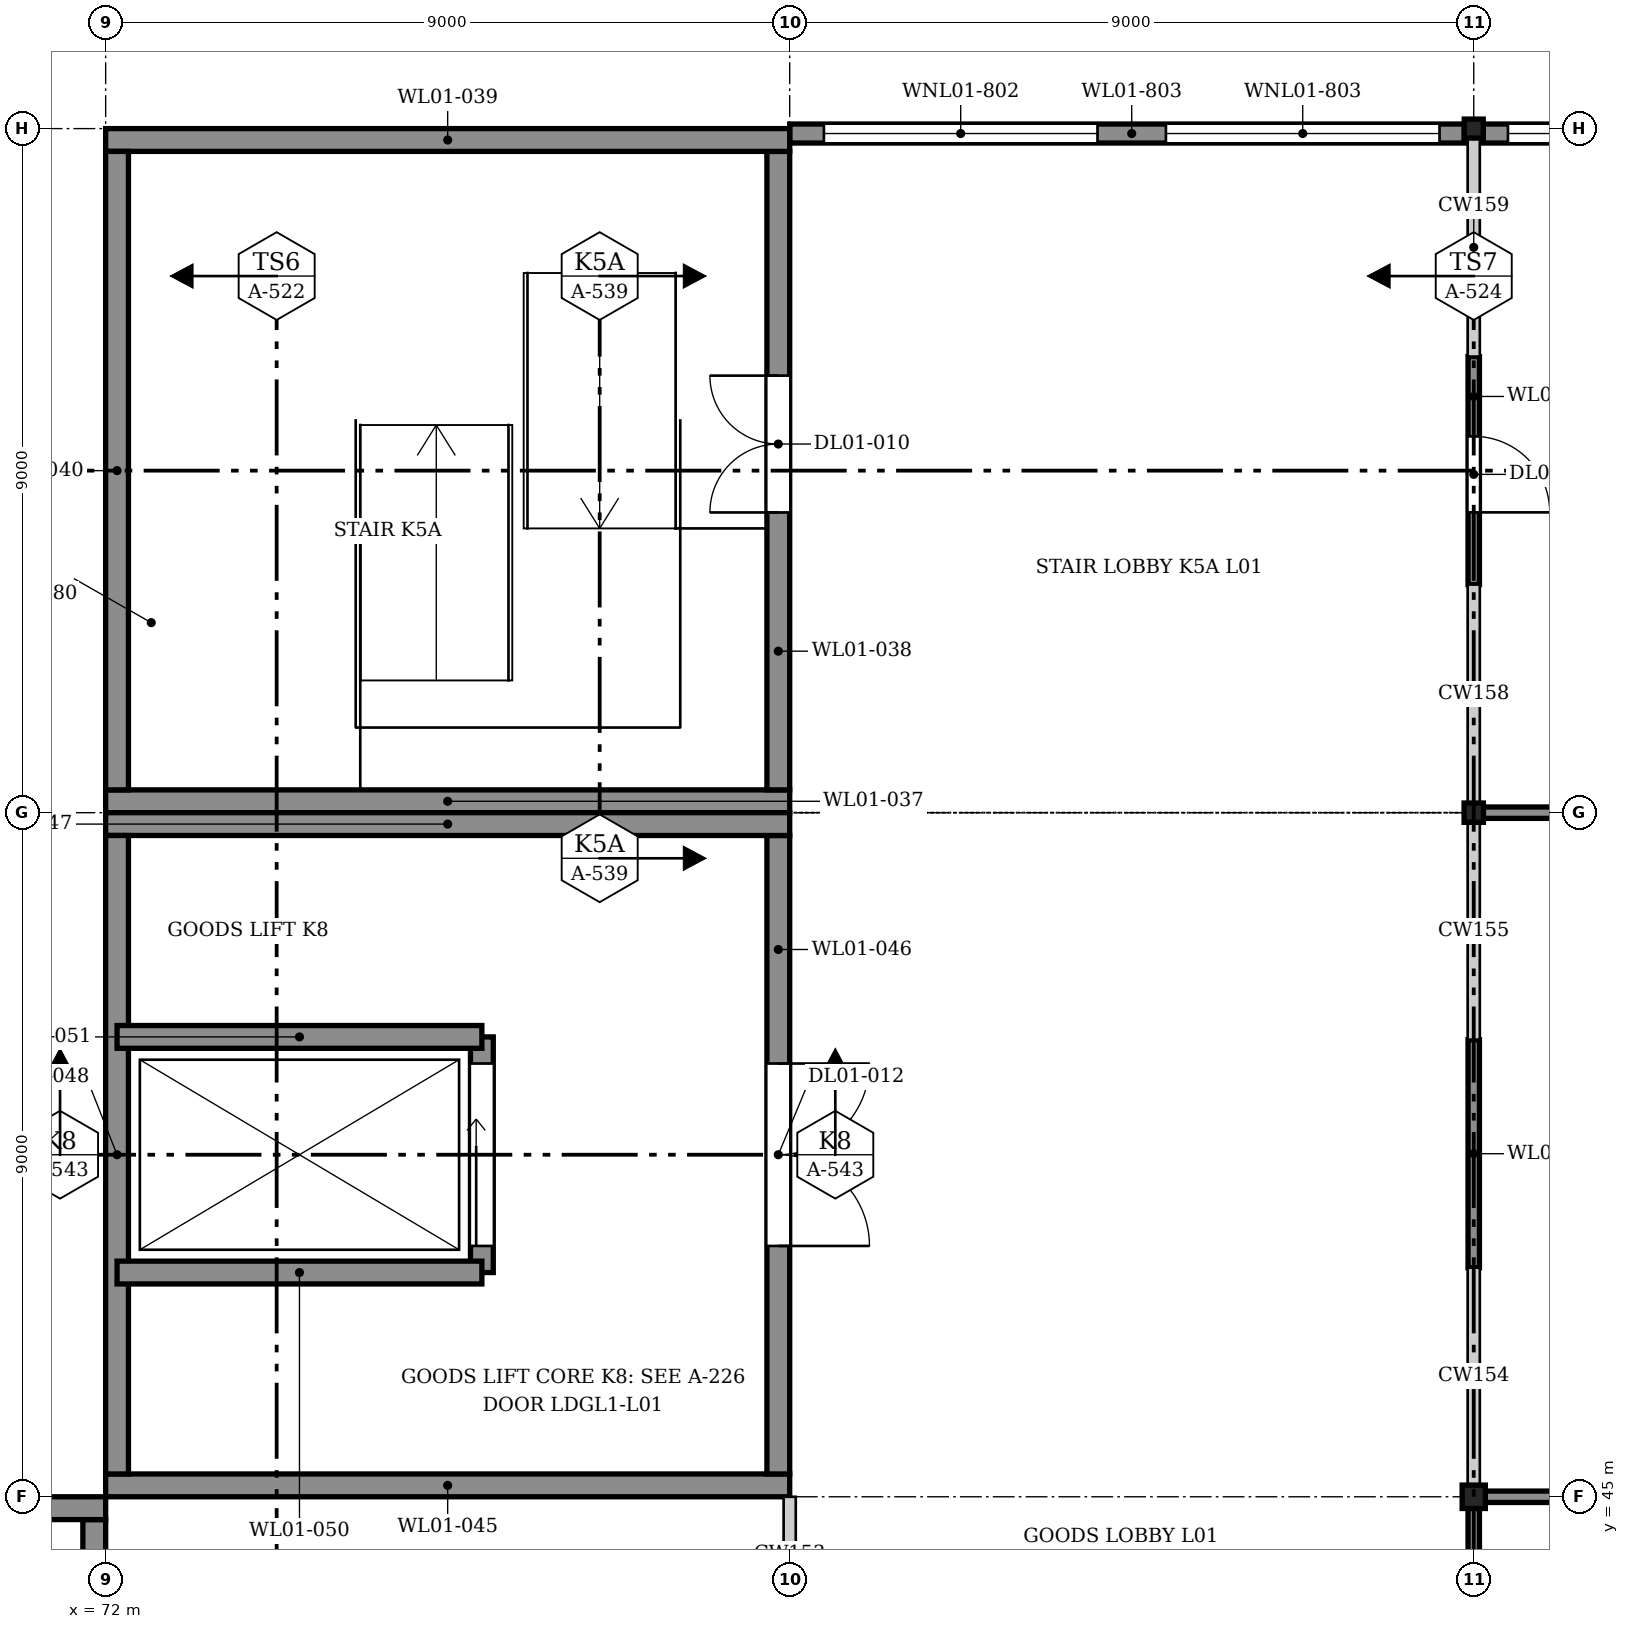
"""IFC4 building model, lengths in metres.
Left out: names, types, materials, properties, quantities, classifications, styles, units other than length and angle.
Written with IfcOpenShell. Run it as: python <this file> out.ifc"""

import sys

from ifc_helpers import new_model, si_unit, direction, frame, frame_2d, origin, origin_2d, place, context, subcontext, project, spatial, rectangle, hollow_rectangle, i_section, extrude, element, fill, save


model = new_model("IFC4")
c1 = context("Model", 3, precision=1e-05, world=origin(), true_north=direction((0.0, 1.0)))
c2 = subcontext(c1, "Body", "Model", "MODEL_VIEW")
j1 = project(units=[si_unit("LENGTHUNIT", "METRE"), si_unit("PLANEANGLEUNIT", "RADIAN")], contexts=[c1])
p1 = place(None, origin())
s1 = spatial("IfcSite", under=j1, at=p1, CompositionType="ELEMENT")
p2 = place(p1, origin())
s2 = spatial("IfcBuilding", under=s1, at=p2, CompositionType="ELEMENT")
p3 = place(p2, frame((0.0, 0.0, 5.0)))
s3 = spatial("IfcBuildingStorey", under=s2, at=p3, CompositionType="ELEMENT", Elevation=5.0)
p4 = place(p3, frame((90.0, 45.0, 0.0), z_axis=(0.0, 0.0, 1.0), x_axis=(1.0, 0.0, 0.0)))
e1 = element("IfcColumn", 1, at=p4, inside=s3, PredefinedType="COLUMN", context=c2, shape_type="SweptSolid", body=[
    extrude(i_section(OverallWidth=0.305, OverallDepth=0.308, WebThickness=0.01, FlangeThickness=0.015, FilletRadius=0.017, at=origin_2d()), origin(), (0.0, 0.0, 1.0), 4.2),
])
p5 = place(p3, frame((90.0, 54.0, 0.0), z_axis=(0.0, 0.0, 1.0), x_axis=(1.0, 0.0, 0.0)))
e2 = element("IfcColumn", 2, at=p5, inside=s3, PredefinedType="COLUMN", context=c2, shape_type="SweptSolid", body=[
    extrude(i_section(OverallWidth=0.254, OverallDepth=0.254, WebThickness=0.009, FlangeThickness=0.014, FilletRadius=0.014, at=origin_2d()), origin(), (0.0, 0.0, 1.0), 3.9),
])
p6 = place(p3, frame((90.0, 63.0, 0.0), z_axis=(0.0, 0.0, 1.0), x_axis=(1.0, 0.0, 0.0)))
e3 = element("IfcColumn", 3, at=p6, inside=s3, PredefinedType="COLUMN", context=c2, shape_type="SweptSolid", body=[
    extrude(hollow_rectangle(XDim=0.25, YDim=0.25, WallThickness=0.01, InnerFilletRadius=0.015, OuterFilletRadius=0.025, at=origin_2d()), origin(), (0.0, 0.0, 1.0), 3.9),
])
p7 = place(p3, frame((90.125, 62.935, 0.0), z_axis=(0.0, 0.0, 1.0), x_axis=(1.0, 0.0, 0.0)))
e4 = element("IfcWall", 4, at=p7, inside=s3, PredefinedType="SOLIDWALL", context=c2, shape_type="SweptSolid", body=[
    extrude(rectangle(XDim=8.875, YDim=0.25, at=frame_2d((4.438, 0.0))), origin(), (0.0, 0.0, 1.0), 2.95),
])
p8 = place(p7, frame((0.325, 0.0, 1.1)))
e5 = element("IfcOpeningElement", 5, at=p8, cuts=e4, PredefinedType="OPENING", context=c2, shape_type="SweptSolid", body=[
    extrude(rectangle(XDim=3.6, YDim=1.2, at=frame_2d((1.8, 0.6))), frame((0.0, 0.135, 0.0), z_axis=(0.0, -1.0, 0.0), x_axis=(1.0, 0.0, 0.0)), (0.0, 0.0, 1.0), 0.27),
])
p9 = place(p7, frame((4.825, 0.0, 1.1)))
e6 = element("IfcOpeningElement", 6, at=p9, cuts=e4, PredefinedType="OPENING", context=c2, shape_type="SweptSolid", body=[
    extrude(rectangle(XDim=3.6, YDim=1.2, at=frame_2d((1.8, 0.6))), frame((0.0, 0.135, 0.0), z_axis=(0.0, -1.0, 0.0), x_axis=(1.0, 0.0, 0.0)), (0.0, 0.0, 1.0), 0.27),
])
p10 = place(p3, frame((81.0, 62.935, 0.0), z_axis=(0.0, 0.0, 1.0), x_axis=(1.0, 0.0, 0.0)))
e7 = element("IfcWall", 7, at=p10, inside=s3, PredefinedType="SOLIDWALL", context=c2, shape_type="SweptSolid", body=[
    extrude(rectangle(XDim=8.875, YDim=0.25, at=frame_2d((4.438, 0.0))), origin(), (0.0, 0.0, 1.0), 2.95),
])
p11 = place(p10, frame((0.45, 0.0, 1.1)))
e8 = element("IfcOpeningElement", 8, at=p11, cuts=e7, PredefinedType="OPENING", context=c2, shape_type="SweptSolid", body=[
    extrude(rectangle(XDim=3.6, YDim=1.2, at=frame_2d((1.8, 0.6))), frame((0.0, 0.135, 0.0), z_axis=(0.0, -1.0, 0.0), x_axis=(1.0, 0.0, 0.0)), (0.0, 0.0, 1.0), 0.27),
])
p12 = place(p10, frame((4.95, 0.0, 1.1)))
e9 = element("IfcOpeningElement", 9, at=p12, cuts=e7, PredefinedType="OPENING", context=c2, shape_type="SweptSolid", body=[
    extrude(rectangle(XDim=3.6, YDim=1.2, at=frame_2d((1.8, 0.6))), frame((0.0, 0.135, 0.0), z_axis=(0.0, -1.0, 0.0), x_axis=(1.0, 0.0, 0.0)), (0.0, 0.0, 1.0), 0.27),
])
p13 = place(p3, frame((71.85, 40.8, 0.0), z_axis=(0.0, 0.0, 1.0), x_axis=(0.0, 1.0, 0.0)))
e10 = element("IfcWall", 10, at=p13, inside=s3, PredefinedType="SOLIDWALL", context=c2, shape_type="SweptSolid", body=[
    extrude(rectangle(XDim=3.9, YDim=0.3, at=frame_2d((1.95, 0.0))), origin(), (0.0, 0.0, 1.0), 4.2),
])
for number, where, z_axis, x_axis in (
    (11, (63.0, 44.85, 0.0), (0.0, 0.0, 1.0), (1.0, 0.0, 0.0)),
    (12, (72.0, 54.15, 0.0), (0.0, 0.0, 1.0), (1.0, 0.0, 0.0)),
):
    element("IfcWall", number, at=place(p3, frame(where, z_axis=z_axis, x_axis=x_axis)), inside=s3, PredefinedType="SOLIDWALL", context=c2, shape_type="SweptSolid", body=[
        extrude(rectangle(XDim=9.0, YDim=0.3, at=frame_2d((4.5, 0.0))), origin(), (0.0, 0.0, 1.0), 4.2),
    ])
p14 = place(p3, frame((80.85, 54.3, 0.0), z_axis=(0.0, 0.0, 1.0), x_axis=(0.0, 1.0, 0.0)))
e13 = element("IfcWall", 13, at=p14, inside=s3, PredefinedType="SOLIDWALL", context=c2, shape_type="SweptSolid", body=[
    extrude(rectangle(XDim=8.4, YDim=0.3, at=frame_2d((4.2, 0.0))), origin(), (0.0, 0.0, 1.0), 4.2),
])
p15 = place(p14, frame((3.65, 0.0, 0.0)))
e14 = element("IfcOpeningElement", 14, at=p15, cuts=e13, PredefinedType="OPENING", context=c2, shape_type="SweptSolid", body=[
    extrude(rectangle(XDim=1.8, YDim=2.1, at=frame_2d((0.9, 1.05))), frame((0.0, 0.16, 0.0), z_axis=(0.0, -1.0, 0.0), x_axis=(1.0, 0.0, 0.0)), (0.0, 0.0, 1.0), 0.32),
])
p16 = place(p3, frame((72.0, 62.85, 0.0), z_axis=(0.0, 0.0, 1.0), x_axis=(1.0, 0.0, 0.0)))
e15 = element("IfcWall", 15, at=p16, inside=s3, PredefinedType="SOLIDWALL", context=c2, shape_type="SweptSolid", body=[
    extrude(rectangle(XDim=9.0, YDim=0.3, at=frame_2d((4.5, 0.0))), origin(), (0.0, 0.0, 1.0), 4.2),
])
p17 = place(p3, frame((72.15, 54.3, 0.0), z_axis=(0.0, 0.0, 1.0), x_axis=(0.0, 1.0, 0.0)))
e16 = element("IfcWall", 16, at=p17, inside=s3, PredefinedType="SOLIDWALL", context=c2, shape_type="SweptSolid", body=[
    extrude(rectangle(XDim=8.4, YDim=0.3, at=frame_2d((4.2, 0.0))), origin(), (0.0, 0.0, 1.0), 4.2),
])
p18 = place(p3, frame((72.0, 45.15, 0.0), z_axis=(0.0, 0.0, 1.0), x_axis=(1.0, 0.0, 0.0)))
e17 = element("IfcWall", 17, at=p18, inside=s3, PredefinedType="SOLIDWALL", context=c2, shape_type="SweptSolid", body=[
    extrude(rectangle(XDim=9.0, YDim=0.3, at=frame_2d((4.5, 0.0))), origin(), (0.0, 0.0, 1.0), 4.2),
])
p19 = place(p3, frame((80.85, 45.3, 0.0), z_axis=(0.0, 0.0, 1.0), x_axis=(0.0, 1.0, 0.0)))
e18 = element("IfcWall", 18, at=p19, inside=s3, PredefinedType="SOLIDWALL", context=c2, shape_type="SweptSolid", body=[
    extrude(rectangle(XDim=8.4, YDim=0.3, at=frame_2d((4.2, 0.0))), origin(), (0.0, 0.0, 1.0), 4.2),
])
p20 = place(p19, frame((3.0, 0.0, 0.0)))
e19 = element("IfcOpeningElement", 19, at=p20, cuts=e18, PredefinedType="OPENING", context=c2, shape_type="SweptSolid", body=[
    extrude(rectangle(XDim=2.4, YDim=2.4, at=frame_2d((1.2, 1.2))), frame((0.0, 0.16, 0.0), z_axis=(0.0, -1.0, 0.0), x_axis=(1.0, 0.0, 0.0)), (0.0, 0.0, 1.0), 0.32),
])
p21 = place(p3, frame((72.0, 53.85, 0.0), z_axis=(0.0, 0.0, 1.0), x_axis=(1.0, 0.0, 0.0)))
e20 = element("IfcWall", 20, at=p21, inside=s3, PredefinedType="SOLIDWALL", context=c2, shape_type="SweptSolid", body=[
    extrude(rectangle(XDim=9.0, YDim=0.3, at=frame_2d((4.5, 0.0))), origin(), (0.0, 0.0, 1.0), 4.2),
])
p22 = place(p3, frame((72.15, 45.3, 0.0), z_axis=(0.0, 0.0, 1.0), x_axis=(0.0, 1.0, 0.0)))
e21 = element("IfcWall", 21, at=p22, inside=s3, PredefinedType="SOLIDWALL", context=c2, shape_type="SweptSolid", body=[
    extrude(rectangle(XDim=8.4, YDim=0.3, at=frame_2d((4.2, 0.0))), origin(), (0.0, 0.0, 1.0), 4.2),
])
p23 = place(p3, frame((76.95, 47.95, 0.0), z_axis=(0.0, 0.0, 1.0), x_axis=(0.0, 1.0, 0.0)))
e22 = element("IfcWall", 22, at=p23, inside=s3, PredefinedType="SOLIDWALL", context=c2, shape_type="SweptSolid", body=[
    extrude(rectangle(XDim=3.1, YDim=0.3, at=frame_2d((1.55, 0.0))), origin(), (0.0, 0.0, 1.0), 4.2),
])
p24 = place(p23, frame((0.35, 0.0, 0.0)))
e23 = element("IfcOpeningElement", 23, at=p24, cuts=e22, PredefinedType="OPENING", context=c2, shape_type="SweptSolid", body=[
    extrude(rectangle(XDim=2.4, YDim=2.4, at=frame_2d((1.2, 1.2))), frame((0.0, 0.16, 0.0), z_axis=(0.0, -1.0, 0.0), x_axis=(1.0, 0.0, 0.0)), (0.0, 0.0, 1.0), 0.32),
])
for number, where, z_axis, x_axis in (
    (24, (72.15, 47.95, 0.0), (0.0, 0.0, 1.0), (1.0, 0.0, 0.0)),
    (25, (72.15, 51.05, 0.0), (0.0, 0.0, 1.0), (1.0, 0.0, 0.0)),
):
    element("IfcWall", number, at=place(p3, frame(where, z_axis=z_axis, x_axis=x_axis)), inside=s3, PredefinedType="SOLIDWALL", context=c2, shape_type="SweptSolid", body=[
        extrude(rectangle(XDim=4.8, YDim=0.3, at=frame_2d((2.4, 0.0))), origin(), (0.0, 0.0, 1.0), 4.2),
    ])
p25 = place(p3, frame((90.0, 39.0, 0.0), z_axis=(0.0, 0.0, 1.0), x_axis=(0.0, 1.0, 0.0)))
e26 = element("IfcWall", 26, at=p25, inside=s3, PredefinedType="PARTITIONING", context=c2, shape_type="SweptSolid", body=[
    extrude(rectangle(XDim=5.846, YDim=0.15, at=frame_2d((2.923, 0.0))), origin(), (0.0, 0.0, 1.0), 3.158),
])
p26 = place(p3, frame((90.0, 48.014, 0.0), z_axis=(0.0, 0.0, 1.0), x_axis=(0.0, 1.0, 0.0)))
e27 = element("IfcWall", 27, at=p26, inside=s3, PredefinedType="PARTITIONING", context=c2, shape_type="SweptSolid", body=[
    extrude(rectangle(XDim=3.0, YDim=0.15, at=frame_2d((1.5, 0.0))), origin(), (0.0, 0.0, 1.0), 2.858),
])
p27 = place(p3, frame((90.153, 45.0, 0.0), z_axis=(0.0, 0.0, 1.0), x_axis=(1.0, 0.0, 0.0)))
e28 = element("IfcWall", 28, at=p27, inside=s3, PredefinedType="PARTITIONING", context=c2, shape_type="SweptSolid", body=[
    extrude(rectangle(XDim=8.695, YDim=0.15, at=frame_2d((4.347, 0.0))), origin(), (0.0, 0.0, 1.0), 2.95),
])
p28 = place(p3, frame((90.127, 54.0, 0.0), z_axis=(0.0, 0.0, 1.0), x_axis=(1.0, 0.0, 0.0)))
e29 = element("IfcWall", 29, at=p28, inside=s3, PredefinedType="PARTITIONING", context=c2, shape_type="SweptSolid", body=[
    extrude(rectangle(XDim=8.873, YDim=0.15, at=frame_2d((4.437, 0.0))), origin(), (0.0, 0.0, 1.0), 2.858),
])
p29 = place(p3, frame((90.0, 57.001, 0.0), z_axis=(0.0, 0.0, 1.0), x_axis=(0.0, 1.0, 0.0)))
e30 = element("IfcWall", 30, at=p29, inside=s3, PredefinedType="PARTITIONING", context=c2, shape_type="SweptSolid", body=[
    extrude(rectangle(XDim=3.0, YDim=0.15, at=frame_2d((1.5, 0.0))), origin(), (0.0, 0.0, 1.0), 2.858),
])
p30 = place(p29, frame((0.95, 0.0, 0.0)))
e31 = element("IfcOpeningElement", 31, at=p30, cuts=e30, PredefinedType="OPENING", context=c2, shape_type="SweptSolid", body=[
    extrude(rectangle(XDim=1.0, YDim=2.1, at=frame_2d((0.5, 1.05))), frame((0.0, 0.085, 0.0), z_axis=(0.0, -1.0, 0.0), x_axis=(1.0, 0.0, 0.0)), (0.0, 0.0, 1.0), 0.17),
])
p31 = place(p8, origin())
e32 = element("IfcWindow", 32, at=p31, inside=s3, PartitioningType="SINGLE_PANEL", PredefinedType="WINDOW", context=c2, shape_type="SweptSolid", body=[
    extrude(rectangle(XDim=3.6, YDim=1.2, at=frame_2d((1.8, 0.6))), frame((0.0, 0.03, 0.0), z_axis=(0.0, -1.0, 0.0), x_axis=(1.0, 0.0, 0.0)), (0.0, 0.0, 1.0), 0.06),
])
fill(e5, e32)
p32 = place(p11, origin())
e33 = element("IfcWindow", 33, at=p32, inside=s3, PartitioningType="SINGLE_PANEL", PredefinedType="WINDOW", context=c2, shape_type="SweptSolid", body=[
    extrude(rectangle(XDim=3.6, YDim=1.2, at=frame_2d((1.8, 0.6))), frame((0.0, 0.03, 0.0), z_axis=(0.0, -1.0, 0.0), x_axis=(1.0, 0.0, 0.0)), (0.0, 0.0, 1.0), 0.06),
])
fill(e8, e33)
p33 = place(p12, origin())
e34 = element("IfcWindow", 34, at=p33, inside=s3, PartitioningType="SINGLE_PANEL", PredefinedType="WINDOW", context=c2, shape_type="SweptSolid", body=[
    extrude(rectangle(XDim=3.6, YDim=1.2, at=frame_2d((1.8, 0.6))), frame((0.0, 0.03, 0.0), z_axis=(0.0, -1.0, 0.0), x_axis=(1.0, 0.0, 0.0)), (0.0, 0.0, 1.0), 0.06),
])
fill(e9, e34)
p34 = place(p15, origin())
e35 = element("IfcDoor", 35, at=p34, inside=s3, OperationType="DOUBLE_DOOR_SINGLE_SWING", PredefinedType="DOOR", context=c2, shape_type="SweptSolid", body=[
    extrude(rectangle(XDim=1.8, YDim=2.1, at=frame_2d((0.9, 1.05))), frame((0.0, 0.025, 0.0), z_axis=(0.0, -1.0, 0.0), x_axis=(1.0, 0.0, 0.0)), (0.0, 0.0, 1.0), 0.05),
])
fill(e14, e35)
p35 = place(p24, origin())
e36 = element("IfcDoor", 36, at=p35, inside=s3, OperationType="DOUBLE_DOOR_SLIDING", PredefinedType="DOOR", context=c2, shape_type="SweptSolid", body=[
    extrude(rectangle(XDim=2.4, YDim=2.4, at=frame_2d((1.2, 1.2))), frame((0.0, 0.025, 0.0), z_axis=(0.0, -1.0, 0.0), x_axis=(1.0, 0.0, 0.0)), (0.0, 0.0, 1.0), 0.05),
])
fill(e23, e36)
p36 = place(p20, frame((2.4, 0.0, 0.0), z_axis=(0.0, 0.0, 1.0), x_axis=(-1.0, 0.0, 0.0)))
e37 = element("IfcDoor", 37, at=p36, inside=s3, OperationType="DOUBLE_DOOR_SINGLE_SWING", PredefinedType="DOOR", context=c2, shape_type="SweptSolid", body=[
    extrude(rectangle(XDim=2.4, YDim=2.4, at=frame_2d((1.2, 1.2))), frame((0.0, 0.025, 0.0), z_axis=(0.0, -1.0, 0.0), x_axis=(1.0, 0.0, 0.0)), (0.0, 0.0, 1.0), 0.05),
])
fill(e19, e37)
p37 = place(p30, frame((1.0, 0.0, 0.0), z_axis=(0.0, 0.0, 1.0), x_axis=(-1.0, 0.0, 0.0)))
e38 = element("IfcDoor", 38, at=p37, inside=s3, OperationType="SINGLE_SWING_LEFT", PredefinedType="DOOR", context=c2, shape_type="SweptSolid", body=[
    extrude(rectangle(XDim=1.0, YDim=2.1, at=frame_2d((0.5, 1.05))), frame((0.0, 0.025, 0.0), z_axis=(0.0, -1.0, 0.0), x_axis=(1.0, 0.0, 0.0)), (0.0, 0.0, 1.0), 0.05),
])
fill(e31, e38)
save(model, sys.argv[1])
